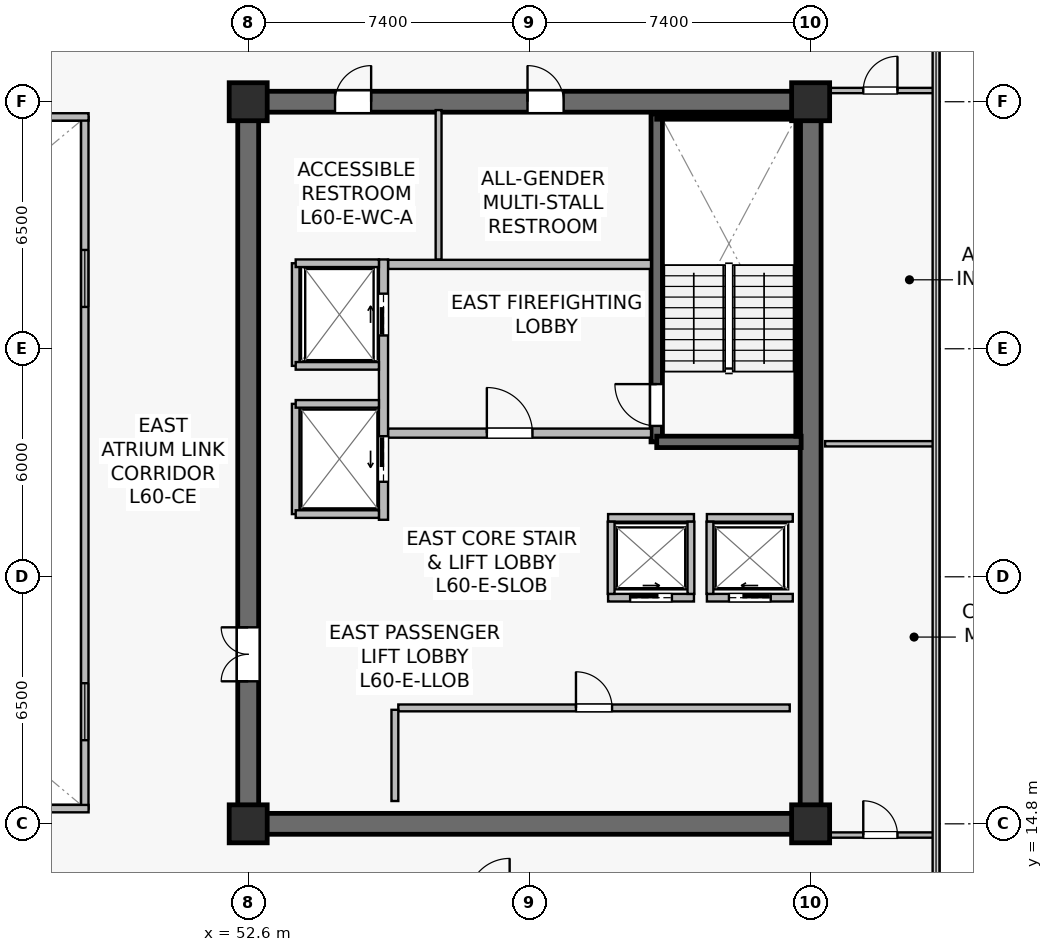
"""IFC4 building model, lengths in metres.
Left out: names, types, materials, properties, quantities, classifications, styles, units other than length and angle.
Written with IfcOpenShell. Run it as: python <this file> out.ifc"""

import sys

from ifc_helpers import new_model, si_unit, direction, frame, frame_2d, origin, origin_2d, place, context, subcontext, project, spatial, rectangle, extrude, source, transform, mapped, element, fill, save


model = new_model("IFC4")
c1 = context("Model", 3, precision=1e-05, world=origin(), true_north=direction((0.0, 1.0)))
c2 = subcontext(c1, "Body", "Model", "MODEL_VIEW")
j1 = project(units=[si_unit("LENGTHUNIT", "METRE"), si_unit("PLANEANGLEUNIT", "RADIAN")], contexts=[c1])
p1 = place(None, origin())
s1 = spatial("IfcSite", under=j1, at=p1, CompositionType="ELEMENT")
p2 = place(p1, origin())
s2 = spatial("IfcBuilding", under=s1, at=p2, CompositionType="ELEMENT")
p3 = place(p2, frame((0.0, 0.0, 250.6)))
s3 = spatial("IfcBuildingStorey", under=s2, at=p3, CompositionType="ELEMENT", Elevation=250.6)
p4 = place(p3, frame((52.325, 14.8, 0.0), z_axis=(0.0, 0.0, 1.0), x_axis=(1.0, 0.0, 0.0)))
e1 = element("IfcWall", 1, at=p4, inside=s3, PredefinedType="SHEAR", context=c2, shape_type="SweptSolid", body=[
    extrude(rectangle(XDim=15.35, YDim=0.55, at=frame_2d((7.675, 0.0))), origin(), (0.0, 0.0, 1.0), 3.8),
])
p5 = place(p3, frame((52.325, 33.8, 0.0), z_axis=(0.0, 0.0, 1.0), x_axis=(1.0, 0.0, 0.0)))
e2 = element("IfcWall", 2, at=p5, inside=s3, PredefinedType="SHEAR", context=c2, shape_type="SweptSolid", body=[
    extrude(rectangle(XDim=15.35, YDim=0.55, at=frame_2d((7.675, 0.0))), origin(), (0.0, 0.0, 1.0), 3.8),
])
p6 = place(p5, frame((7.625, 0.0, 0.0)))
e3 = element("IfcOpeningElement", 3, at=p6, cuts=e2, PredefinedType="OPENING", context=c2, shape_type="SweptSolid", body=[
    extrude(rectangle(XDim=0.95, YDim=2.15, at=frame_2d((0.475, 1.075))), frame((0.0, 0.285, 0.0), z_axis=(0.0, -1.0, 0.0), x_axis=(1.0, 0.0, 0.0)), (0.0, 0.0, 1.0), 0.57),
])
p7 = place(p5, frame((2.56, 0.0, 0.0)))
e4 = element("IfcOpeningElement", 4, at=p7, cuts=e2, PredefinedType="OPENING", context=c2, shape_type="SweptSolid", body=[
    extrude(rectangle(XDim=0.95, YDim=2.15, at=frame_2d((0.475, 1.075))), frame((0.0, 0.285, 0.0), z_axis=(0.0, -1.0, 0.0), x_axis=(1.0, 0.0, 0.0)), (0.0, 0.0, 1.0), 0.57),
])
p8 = place(p3, frame((52.6, 15.075, 0.0), z_axis=(0.0, 0.0, 1.0), x_axis=(0.0, 1.0, 0.0)))
e5 = element("IfcWall", 5, at=p8, inside=s3, PredefinedType="SHEAR", context=c2, shape_type="SweptSolid", body=[
    extrude(rectangle(XDim=18.45, YDim=0.55, at=frame_2d((9.225, 0.0))), origin(), (0.0, 0.0, 1.0), 3.8),
])
p9 = place(p8, frame((3.475, 0.0, 0.0)))
e6 = element("IfcOpeningElement", 6, at=p9, cuts=e5, PredefinedType="OPENING", context=c2, shape_type="SweptSolid", body=[
    extrude(rectangle(XDim=1.42, YDim=2.2, at=frame_2d((0.71, 1.1))), frame((0.0, 0.285, 0.0), z_axis=(0.0, -1.0, 0.0), x_axis=(1.0, 0.0, 0.0)), (0.0, 0.0, 1.0), 0.57),
])
p10 = place(p3, frame((67.4, 15.075, 0.0), z_axis=(0.0, 0.0, 1.0), x_axis=(0.0, 1.0, 0.0)))
e7 = element("IfcWall", 7, at=p10, inside=s3, PredefinedType="SHEAR", context=c2, shape_type="SweptSolid", body=[
    extrude(rectangle(XDim=18.45, YDim=0.55, at=frame_2d((9.225, 0.0))), origin(), (0.0, 0.0, 1.0), 3.8),
])
p11 = place(p3, frame((63.35, 24.85, 0.0), z_axis=(0.0, 0.0, 1.0), x_axis=(0.0, 1.0, 0.0)))
e8 = element("IfcWall", 8, at=p11, inside=s3, PredefinedType="SHEAR", context=c2, shape_type="SweptSolid", body=[
    extrude(rectangle(XDim=8.63, YDim=0.3, at=frame_2d((4.315, 0.0))), origin(), (0.0, 0.0, 1.0), 3.8),
])
p12 = place(p11, frame((0.42, 0.0, 0.0)))
e9 = element("IfcOpeningElement", 9, at=p12, cuts=e8, PredefinedType="OPENING", context=c2, shape_type="SweptSolid", body=[
    extrude(rectangle(XDim=1.1, YDim=2.15, at=frame_2d((0.55, 1.075))), frame((0.0, 0.16, 0.0), z_axis=(0.0, -1.0, 0.0), x_axis=(1.0, 0.0, 0.0)), (0.0, 0.0, 1.0), 0.32),
])
p13 = place(p3, frame((63.35, 24.85, 0.0), z_axis=(0.0, 0.0, 1.0), x_axis=(1.0, 0.0, 0.0)))
e10 = element("IfcWall", 10, at=p13, inside=s3, PredefinedType="SHEAR", context=c2, shape_type="SweptSolid", body=[
    extrude(rectangle(XDim=3.8, YDim=0.3, at=frame_2d((1.9, 0.0))), origin(), (0.0, 0.0, 1.0), 3.8),
])
p14 = place(p3, frame((63.35, 33.4, 0.0), z_axis=(0.0, 0.0, 1.0), x_axis=(1.0, 0.0, 0.0)))
e11 = element("IfcWall", 11, at=p14, inside=s3, PredefinedType="SOLIDWALL", context=c2, shape_type="SweptSolid", body=[
    extrude(rectangle(XDim=3.72, YDim=0.12, at=frame_2d((1.86, 0.0))), origin(), (0.0, 0.0, 1.0), 3.8),
])
p15 = place(p3, frame((67.07, 25.0, 0.0), z_axis=(0.0, 0.0, 1.0), x_axis=(0.0, 1.0, 0.0)))
e12 = element("IfcWall", 12, at=p15, inside=s3, PredefinedType="SOLIDWALL", context=c2, shape_type="SweptSolid", body=[
    extrude(rectangle(XDim=8.32, YDim=0.12, at=frame_2d((4.16, 0.0))), origin(), (0.0, 0.0, 1.0), 3.8),
])
m1 = source(origin(), c2, "Body", "SweptSolid", [
    extrude(rectangle(XDim=1.0, YDim=1.0, at=origin_2d()), origin(), (0.0, 0.0, 1.0), 4.1),
])
for number, where, z_axis, x_axis in (
    (13, (52.6, 14.8, 0.0), (0.0, 0.0, 1.0), (1.0, 0.0, 0.0)),
    (14, (67.4, 14.8, 0.0), (0.0, 0.0, 1.0), (1.0, 0.0, 0.0)),
    (15, (52.6, 33.8, 0.0), (0.0, 0.0, 1.0), (1.0, 0.0, 0.0)),
    (16, (67.4, 33.8, 0.0), (0.0, 0.0, 1.0), (1.0, 0.0, 0.0)),
):
    element("IfcColumn", number, at=place(p3, frame(where, z_axis=z_axis, x_axis=x_axis)), inside=s3, PredefinedType="COLUMN", context=c2, shape_type="MappedRepresentation", body=[
        mapped(m1, transform((0.0, 0.0, 0.0), scale=1.0)),
    ])
p16 = place(p3, frame((56.28, 25.08, 0.0), z_axis=(0.0, 0.0, 1.0), x_axis=(1.0, 0.0, 0.0)))
e17 = element("IfcWall", 17, at=p16, inside=s3, PredefinedType="SOLIDWALL", context=c2, shape_type="SweptSolid", body=[
    extrude(rectangle(XDim=6.92, YDim=0.24, at=frame_2d((3.46, 0.0))), origin(), (0.0, 0.0, 1.0), 3.197),
])
p17 = place(p16, frame((2.6, 0.0, 0.0)))
e18 = element("IfcOpeningElement", 18, at=p17, cuts=e17, PredefinedType="OPENING", context=c2, shape_type="SweptSolid", body=[
    extrude(rectangle(XDim=1.2, YDim=2.16, at=frame_2d((0.6, 1.08))), frame((0.0, 0.13, 0.0), z_axis=(0.0, -1.0, 0.0), x_axis=(1.0, 0.0, 0.0)), (0.0, 0.0, 1.0), 0.26),
])
p18 = place(p3, frame((56.28, 29.52, 0.0), z_axis=(0.0, 0.0, 1.0), x_axis=(1.0, 0.0, 0.0)))
e19 = element("IfcWall", 19, at=p18, inside=s3, PredefinedType="SOLIDWALL", context=c2, shape_type="SweptSolid", body=[
    extrude(rectangle(XDim=6.92, YDim=0.24, at=frame_2d((3.46, 0.0))), origin(), (0.0, 0.0, 1.0), 3.197),
])
p19 = place(p3, frame((56.16, 22.8, 0.0), z_axis=(0.0, 0.0, 1.0), x_axis=(0.0, 1.0, 0.0)))
e20 = element("IfcWall", 20, at=p19, inside=s3, PredefinedType="SOLIDWALL", context=c2, shape_type="SweptSolid", body=[
    extrude(rectangle(XDim=6.85, YDim=0.24, at=frame_2d((3.425, 0.0))), origin(), (0.0, 0.0, 1.0), 2.935),
])
p20 = place(p19, frame((4.85, 0.0, 0.0)))
e21 = element("IfcOpeningElement", 21, at=p20, cuts=e20, PredefinedType="OPENING", context=c2, shape_type="SweptSolid", body=[
    extrude(rectangle(XDim=1.1, YDim=2.22, at=frame_2d((0.55, 1.11))), frame((0.0, 0.13, 0.0), z_axis=(0.0, -1.0, 0.0), x_axis=(1.0, 0.0, 0.0)), (0.0, 0.0, 1.0), 0.26),
])
p21 = place(p19, frame((1.0, 0.0, 0.0)))
e22 = element("IfcOpeningElement", 22, at=p21, cuts=e20, PredefinedType="OPENING", context=c2, shape_type="SweptSolid", body=[
    extrude(rectangle(XDim=1.2, YDim=2.22, at=frame_2d((0.6, 1.11))), frame((0.0, 0.13, 0.0), z_axis=(0.0, -1.0, 0.0), x_axis=(1.0, 0.0, 0.0)), (0.0, 0.0, 1.0), 0.26),
])
p22 = place(p3, frame((64.67, 20.75, 0.0), z_axis=(0.0, 0.0, 1.0), x_axis=(1.0, 0.0, 0.0)))
e23 = element("IfcWall", 23, at=p22, inside=s3, PredefinedType="SOLIDWALL", context=c2, shape_type="SweptSolid", body=[
    extrude(rectangle(XDim=2.26, YDim=0.2, at=frame_2d((1.13, 0.0))), origin(), (0.0, 0.0, 1.0), 3.8),
])
p23 = place(p22, frame((0.58, 0.0, 0.0)))
e24 = element("IfcOpeningElement", 24, at=p23, cuts=e23, PredefinedType="OPENING", context=c2, shape_type="SweptSolid", body=[
    extrude(rectangle(XDim=1.1, YDim=2.22, at=frame_2d((0.55, 1.11))), frame((0.0, 0.11, 0.0), z_axis=(0.0, -1.0, 0.0), x_axis=(1.0, 0.0, 0.0)), (0.0, 0.0, 1.0), 0.22),
])
p24 = place(p3, frame((64.67, 22.85, 0.0), z_axis=(0.0, 0.0, 1.0), x_axis=(1.0, 0.0, 0.0)))
e25 = element("IfcWall", 25, at=p24, inside=s3, PredefinedType="SOLIDWALL", context=c2, shape_type="SweptSolid", body=[
    extrude(rectangle(XDim=2.26, YDim=0.2, at=frame_2d((1.13, 0.0))), origin(), (0.0, 0.0, 1.0), 3.8),
])
p25 = place(p3, frame((64.75, 20.85, 0.0), z_axis=(0.0, 0.0, 1.0), x_axis=(0.0, 1.0, 0.0)))
e26 = element("IfcWall", 26, at=p25, inside=s3, PredefinedType="SOLIDWALL", context=c2, shape_type="SweptSolid", body=[
    extrude(rectangle(XDim=1.9, YDim=0.18, at=frame_2d((0.95, 0.0))), origin(), (0.0, 0.0, 1.0), 3.8),
])
p26 = place(p3, frame((62.07, 20.75, 0.0), z_axis=(0.0, 0.0, 1.0), x_axis=(1.0, 0.0, 0.0)))
e27 = element("IfcWall", 27, at=p26, inside=s3, PredefinedType="SOLIDWALL", context=c2, shape_type="SweptSolid", body=[
    extrude(rectangle(XDim=2.26, YDim=0.2, at=frame_2d((1.13, 0.0))), origin(), (0.0, 0.0, 1.0), 3.8),
])
p27 = place(p26, frame((0.58, 0.0, 0.0)))
e28 = element("IfcOpeningElement", 28, at=p27, cuts=e27, PredefinedType="OPENING", context=c2, shape_type="SweptSolid", body=[
    extrude(rectangle(XDim=1.1, YDim=2.22, at=frame_2d((0.55, 1.11))), frame((0.0, 0.11, 0.0), z_axis=(0.0, -1.0, 0.0), x_axis=(1.0, 0.0, 0.0)), (0.0, 0.0, 1.0), 0.22),
])
p28 = place(p3, frame((62.07, 22.85, 0.0), z_axis=(0.0, 0.0, 1.0), x_axis=(1.0, 0.0, 0.0)))
e29 = element("IfcWall", 29, at=p28, inside=s3, PredefinedType="SOLIDWALL", context=c2, shape_type="SweptSolid", body=[
    extrude(rectangle(XDim=2.26, YDim=0.2, at=frame_2d((1.13, 0.0))), origin(), (0.0, 0.0, 1.0), 3.8),
])
for number, where, z_axis, x_axis in (
    (30, (62.15, 20.85, 0.0), (0.0, 0.0, 1.0), (0.0, 1.0, 0.0)),
    (31, (64.25, 20.85, 0.0), (0.0, 0.0, 1.0), (0.0, 1.0, 0.0)),
):
    element("IfcWall", number, at=place(p3, frame(where, z_axis=z_axis, x_axis=x_axis)), inside=s3, PredefinedType="SOLIDWALL", context=c2, shape_type="SweptSolid", body=[
        extrude(rectangle(XDim=1.9, YDim=0.18, at=frame_2d((0.95, 0.0))), origin(), (0.0, 0.0, 1.0), 3.8),
    ])
p29 = place(p3, frame((53.85, 26.85, 0.0), z_axis=(0.0, 0.0, 1.0), x_axis=(0.0, 1.0, 0.0)))
e32 = element("IfcWall", 32, at=p29, inside=s3, PredefinedType="SOLIDWALL", context=c2, shape_type="SweptSolid", body=[
    extrude(rectangle(XDim=2.7, YDim=0.2, at=frame_2d((1.35, 0.0))), origin(), (0.0, 0.0, 1.0), 3.8),
])
p30 = place(p3, frame((53.85, 29.55, 0.0), z_axis=(0.0, 0.0, 1.0), x_axis=(1.0, 0.0, 0.0)))
e33 = element("IfcWall", 33, at=p30, inside=s3, PredefinedType="SOLIDWALL", context=c2, shape_type="SweptSolid", body=[
    extrude(rectangle(XDim=2.19, YDim=0.2, at=frame_2d((1.095, 0.0))), origin(), (0.0, 0.0, 1.0), 3.8),
])
p31 = place(p3, frame((53.85, 26.85, 0.0), z_axis=(0.0, 0.0, 1.0), x_axis=(1.0, 0.0, 0.0)))
e34 = element("IfcWall", 34, at=p31, inside=s3, PredefinedType="SOLIDWALL", context=c2, shape_type="SweptSolid", body=[
    extrude(rectangle(XDim=2.19, YDim=0.2, at=frame_2d((1.095, 0.0))), origin(), (0.0, 0.0, 1.0), 3.197),
])
p32 = place(p3, frame((53.85, 22.95, 0.0), z_axis=(0.0, 0.0, 1.0), x_axis=(0.0, 1.0, 0.0)))
e35 = element("IfcWall", 35, at=p32, inside=s3, PredefinedType="SOLIDWALL", context=c2, shape_type="SweptSolid", body=[
    extrude(rectangle(XDim=2.9, YDim=0.2, at=frame_2d((1.45, 0.0))), origin(), (0.0, 0.0, 1.0), 2.935),
])
for number, where, z_axis, x_axis in (
    (36, (53.85, 25.85, 0.0), (0.0, 0.0, 1.0), (1.0, 0.0, 0.0)),
    (37, (53.85, 22.95, 0.0), (0.0, 0.0, 1.0), (1.0, 0.0, 0.0)),
):
    element("IfcWall", number, at=place(p3, frame(where, z_axis=z_axis, x_axis=x_axis)), inside=s3, PredefinedType="SOLIDWALL", context=c2, shape_type="SweptSolid", body=[
        extrude(rectangle(XDim=2.19, YDim=0.2, at=frame_2d((1.095, 0.0))), origin(), (0.0, 0.0, 1.0), 3.8),
    ])
p33 = place(p3, frame((56.55, 17.85, 0.0), z_axis=(0.0, 0.0, 1.0), x_axis=(1.0, 0.0, 0.0)))
e38 = element("IfcWall", 38, at=p33, inside=s3, PredefinedType="SOLIDWALL", context=c2, shape_type="SweptSolid", body=[
    extrude(rectangle(XDim=10.3, YDim=0.18, at=frame_2d((5.15, 0.0))), origin(), (0.0, 0.0, 1.0), 3.197),
])
p34 = place(p33, frame((4.675, 0.0, 0.0)))
e39 = element("IfcOpeningElement", 39, at=p34, cuts=e38, PredefinedType="OPENING", context=c2, shape_type="SweptSolid", body=[
    extrude(rectangle(XDim=0.95, YDim=2.15, at=frame_2d((0.475, 1.075))), frame((0.0, 0.1, 0.0), z_axis=(0.0, -1.0, 0.0), x_axis=(1.0, 0.0, 0.0)), (0.0, 0.0, 1.0), 0.2),
])
p35 = place(p3, frame((56.46, 15.4, 0.0), z_axis=(0.0, 0.0, 1.0), x_axis=(0.0, 1.0, 0.0)))
e40 = element("IfcWall", 40, at=p35, inside=s3, PredefinedType="SOLIDWALL", context=c2, shape_type="SweptSolid", body=[
    extrude(rectangle(XDim=2.4, YDim=0.18, at=frame_2d((1.2, 0.0))), origin(), (0.0, 0.0, 1.0), 3.8),
])
p36 = place(p3, frame((57.61, 29.65, 0.0), z_axis=(0.0, 0.0, 1.0), x_axis=(0.0, 1.0, 0.0)))
e41 = element("IfcWall", 41, at=p36, inside=s3, PredefinedType="PLUMBINGWALL", context=c2, shape_type="SweptSolid", body=[
    extrude(rectangle(XDim=3.93, YDim=0.155, at=frame_2d((1.965, 0.0))), origin(), (0.0, 0.0, 1.0), 3.8),
])
p37 = place(p3, frame((48.3, 15.2, 0.0), z_axis=(0.0, 0.0, 1.0), x_axis=(0.0, 1.0, 0.0)))
e42 = element("IfcWall", 42, at=p37, inside=s3, PredefinedType="SOLIDWALL", context=c2, shape_type="SweptSolid", body=[
    extrude(rectangle(XDim=18.2, YDim=0.195, at=frame_2d((9.1, 0.0))), origin(), (0.0, 0.0, 1.0), 3.8),
])
p38 = place(p37, frame((1.8, 0.0, 0.9)))
e43 = element("IfcOpeningElement", 43, at=p38, cuts=e42, PredefinedType="OPENING", context=c2, shape_type="SweptSolid", body=[
    extrude(rectangle(XDim=1.5, YDim=1.4, at=frame_2d((0.75, 0.7))), frame((0.0, 0.107, 0.0), z_axis=(0.0, -1.0, 0.0), x_axis=(1.0, 0.0, 0.0)), (0.0, 0.0, 1.0), 0.215),
])
p39 = place(p37, frame((13.2, 0.0, 0.9)))
e44 = element("IfcOpeningElement", 44, at=p39, cuts=e42, PredefinedType="OPENING", context=c2, shape_type="SweptSolid", body=[
    extrude(rectangle(XDim=1.5, YDim=1.4, at=frame_2d((0.75, 0.7))), frame((0.0, 0.107, 0.0), z_axis=(0.0, -1.0, 0.0), x_axis=(1.0, 0.0, 0.0)), (0.0, 0.0, 1.0), 0.215),
])
for number, where, z_axis, x_axis in (
    (45, (26.4, 15.2, 0.0), (0.0, 0.0, 1.0), (1.0, 0.0, 0.0)),
    (46, (26.4, 33.4, 0.0), (0.0, 0.0, 1.0), (1.0, 0.0, 0.0)),
):
    element("IfcWall", number, at=place(p3, frame(where, z_axis=z_axis, x_axis=x_axis)), inside=s3, PredefinedType="SOLIDWALL", context=c2, shape_type="SweptSolid", body=[
        extrude(rectangle(XDim=22.0, YDim=0.195, at=frame_2d((11.0, 0.0))), origin(), (0.0, 0.0, 1.0), 3.8),
    ])
p40 = place(p3, frame((67.78, 24.8, 0.0), z_axis=(0.0, 0.0, 1.0), x_axis=(1.0, 0.0, 0.0)))
e47 = element("IfcWall", 47, at=p40, inside=s3, PredefinedType="PARTITIONING", context=c2, shape_type="SweptSolid", body=[
    extrude(rectangle(XDim=2.91, YDim=0.14, at=frame_2d((1.455, 0.0))), origin(), (0.0, 0.0, 1.0), 3.8),
])
p41 = place(p3, frame((67.78, 14.505, 0.0), z_axis=(0.0, 0.0, 1.0), x_axis=(1.0, 0.0, 0.0)))
e48 = element("IfcWall", 48, at=p41, inside=s3, PredefinedType="PARTITIONING", context=c2, shape_type="SweptSolid", body=[
    extrude(rectangle(XDim=2.91, YDim=0.14, at=frame_2d((1.455, 0.0))), origin(), (0.0, 0.0, 1.0), 3.8),
])
p42 = place(p41, frame((1.005, 0.0, 0.0)))
e49 = element("IfcOpeningElement", 49, at=p42, cuts=e48, PredefinedType="OPENING", context=c2, shape_type="SweptSolid", body=[
    extrude(rectangle(XDim=0.9, YDim=2.1, at=frame_2d((0.45, 1.05))), frame((0.0, 0.08, 0.0), z_axis=(0.0, -1.0, 0.0), x_axis=(1.0, 0.0, 0.0)), (0.0, 0.0, 1.0), 0.16),
])
p43 = place(p3, frame((67.78, 34.095, 0.0), z_axis=(0.0, 0.0, 1.0), x_axis=(1.0, 0.0, 0.0)))
e50 = element("IfcWall", 50, at=p43, inside=s3, PredefinedType="PARTITIONING", context=c2, shape_type="SweptSolid", body=[
    extrude(rectangle(XDim=2.91, YDim=0.14, at=frame_2d((1.455, 0.0))), origin(), (0.0, 0.0, 1.0), 3.8),
])
p44 = place(p43, frame((1.005, 0.0, 0.0)))
e51 = element("IfcOpeningElement", 51, at=p44, cuts=e50, PredefinedType="OPENING", context=c2, shape_type="SweptSolid", body=[
    extrude(rectangle(XDim=0.9, YDim=2.1, at=frame_2d((0.45, 1.05))), frame((0.0, 0.08, 0.0), z_axis=(0.0, -1.0, 0.0), x_axis=(1.0, 0.0, 0.0)), (0.0, 0.0, 1.0), 0.16),
])
m2 = source(origin(), c2, "Body", "SweptSolid", [
    extrude(rectangle(XDim=1.5, YDim=1.4, at=frame_2d((0.75, 0.7))), frame((0.0, 0.03, 0.0), z_axis=(0.0, -1.0, 0.0), x_axis=(1.0, 0.0, 0.0)), (0.0, 0.0, 1.0), 0.06),
])
p45 = place(p38, origin())
e52 = element("IfcWindow", 52, at=p45, inside=s3, PartitioningType="SINGLE_PANEL", PredefinedType="WINDOW", context=c2, shape_type="MappedRepresentation", body=[
    mapped(m2, transform((0.0, 0.0, 0.0), scale=1.0)),
])
fill(e43, e52)
p46 = place(p39, origin())
e53 = element("IfcWindow", 53, at=p46, inside=s3, PartitioningType="SINGLE_PANEL", PredefinedType="WINDOW", context=c2, shape_type="MappedRepresentation", body=[
    mapped(m2, transform((0.0, 0.0, 0.0), scale=1.0)),
])
fill(e44, e53)
m3 = source(origin(), c2, "Body", "SweptSolid", [
    extrude(rectangle(XDim=1.1, YDim=2.15, at=frame_2d((0.55, 1.075))), frame((0.0, 0.025, 0.0), z_axis=(0.0, -1.0, 0.0), x_axis=(1.0, 0.0, 0.0)), (0.0, 0.0, 1.0), 0.05),
])
p47 = place(p12, origin())
e54 = element("IfcDoor", 54, at=p47, inside=s3, OperationType="SINGLE_SWING_RIGHT", PredefinedType="DOOR", context=c2, shape_type="MappedRepresentation", body=[
    mapped(m3, transform((0.0, 0.0, 0.0), scale=1.0)),
])
fill(e9, e54)
m4 = source(origin(), c2, "Body", "SweptSolid", [
    extrude(rectangle(XDim=1.2, YDim=2.16, at=frame_2d((0.6, 1.08))), frame((0.0, 0.025, 0.0), z_axis=(0.0, -1.0, 0.0), x_axis=(1.0, 0.0, 0.0)), (0.0, 0.0, 1.0), 0.05),
])
p48 = place(p17, origin())
e55 = element("IfcDoor", 55, at=p48, inside=s3, OperationType="SINGLE_SWING_LEFT", PredefinedType="DOOR", context=c2, shape_type="MappedRepresentation", body=[
    mapped(m4, transform((0.0, 0.0, 0.0), scale=1.0)),
])
fill(e18, e55)
m5 = source(origin(), c2, "Body", "SweptSolid", [
    extrude(rectangle(XDim=1.1, YDim=2.22, at=frame_2d((0.55, 1.11))), frame((0.0, 0.025, 0.0), z_axis=(0.0, -1.0, 0.0), x_axis=(1.0, 0.0, 0.0)), (0.0, 0.0, 1.0), 0.05),
])
p49 = place(p23, origin())
e56 = element("IfcDoor", 56, at=p49, inside=s3, OperationType="SLIDING_TO_LEFT", PredefinedType="USERDEFINED", context=c2, shape_type="MappedRepresentation", body=[
    mapped(m5, transform((0.0, 0.0, 0.0), scale=1.0)),
])
fill(e24, e56)
p50 = place(p27, origin())
e57 = element("IfcDoor", 57, at=p50, inside=s3, OperationType="SLIDING_TO_RIGHT", PredefinedType="USERDEFINED", context=c2, shape_type="MappedRepresentation", body=[
    mapped(m5, transform((0.0, 0.0, 0.0), scale=1.0)),
])
fill(e28, e57)
p51 = place(p20, origin())
e58 = element("IfcDoor", 58, at=p51, inside=s3, OperationType="SLIDING_TO_RIGHT", PredefinedType="USERDEFINED", context=c2, shape_type="MappedRepresentation", body=[
    mapped(m5, transform((0.0, 0.0, 0.0), scale=1.0)),
])
fill(e21, e58)
m6 = source(origin(), c2, "Body", "SweptSolid", [
    extrude(rectangle(XDim=1.2, YDim=2.22, at=frame_2d((0.6, 1.11))), frame((0.0, 0.025, 0.0), z_axis=(0.0, -1.0, 0.0), x_axis=(1.0, 0.0, 0.0)), (0.0, 0.0, 1.0), 0.05),
])
p52 = place(p21, origin())
e59 = element("IfcDoor", 59, at=p52, inside=s3, OperationType="SLIDING_TO_LEFT", PredefinedType="USERDEFINED", context=c2, shape_type="MappedRepresentation", body=[
    mapped(m6, transform((0.0, 0.0, 0.0), scale=1.0)),
])
fill(e22, e59)
m7 = source(origin(), c2, "Body", "SweptSolid", [
    extrude(rectangle(XDim=0.95, YDim=2.15, at=frame_2d((0.475, 1.075))), frame((0.0, 0.025, 0.0), z_axis=(0.0, -1.0, 0.0), x_axis=(1.0, 0.0, 0.0)), (0.0, 0.0, 1.0), 0.05),
])
p53 = place(p34, origin())
e60 = element("IfcDoor", 60, at=p53, inside=s3, OperationType="SINGLE_SWING_LEFT", PredefinedType="DOOR", context=c2, shape_type="MappedRepresentation", body=[
    mapped(m7, transform((0.0, 0.0, 0.0), scale=1.0)),
])
fill(e39, e60)
m8 = source(origin(), c2, "Body", "SweptSolid", [
    extrude(rectangle(XDim=1.42, YDim=2.2, at=frame_2d((0.71, 1.1))), frame((0.0, 0.025, 0.0), z_axis=(0.0, -1.0, 0.0), x_axis=(1.0, 0.0, 0.0)), (0.0, 0.0, 1.0), 0.05),
])
p54 = place(p9, origin())
e61 = element("IfcDoor", 61, at=p54, inside=s3, OperationType="DOUBLE_DOOR_SINGLE_SWING", PredefinedType="DOOR", context=c2, shape_type="MappedRepresentation", body=[
    mapped(m8, transform((0.0, 0.0, 0.0), scale=1.0)),
])
fill(e6, e61)
p55 = place(p6, origin())
e62 = element("IfcDoor", 62, at=p55, inside=s3, OperationType="SINGLE_SWING_LEFT", PredefinedType="DOOR", context=c2, shape_type="MappedRepresentation", body=[
    mapped(m7, transform((0.0, 0.0, 0.0), scale=1.0)),
])
fill(e3, e62)
p56 = place(p7, origin())
e63 = element("IfcDoor", 63, at=p56, inside=s3, OperationType="SINGLE_SWING_RIGHT", PredefinedType="DOOR", context=c2, shape_type="MappedRepresentation", body=[
    mapped(m7, transform((0.0, 0.0, 0.0), scale=1.0)),
])
fill(e4, e63)
m9 = source(origin(), c2, "Body", "SweptSolid", [
    extrude(rectangle(XDim=0.9, YDim=2.1, at=frame_2d((0.45, 1.05))), frame((0.0, 0.025, 0.0), z_axis=(0.0, -1.0, 0.0), x_axis=(1.0, 0.0, 0.0)), (0.0, 0.0, 1.0), 0.05),
])
p57 = place(p42, origin())
e64 = element("IfcDoor", 64, at=p57, inside=s3, OperationType="SINGLE_SWING_LEFT", PredefinedType="DOOR", context=c2, shape_type="MappedRepresentation", body=[
    mapped(m9, transform((0.0, 0.0, 0.0), scale=1.0)),
])
fill(e49, e64)
p58 = place(p44, origin())
e65 = element("IfcDoor", 65, at=p58, inside=s3, OperationType="SINGLE_SWING_RIGHT", PredefinedType="DOOR", context=c2, shape_type="MappedRepresentation", body=[
    mapped(m9, transform((0.0, 0.0, 0.0), scale=1.0)),
])
fill(e51, e65)
save(model, sys.argv[1])
